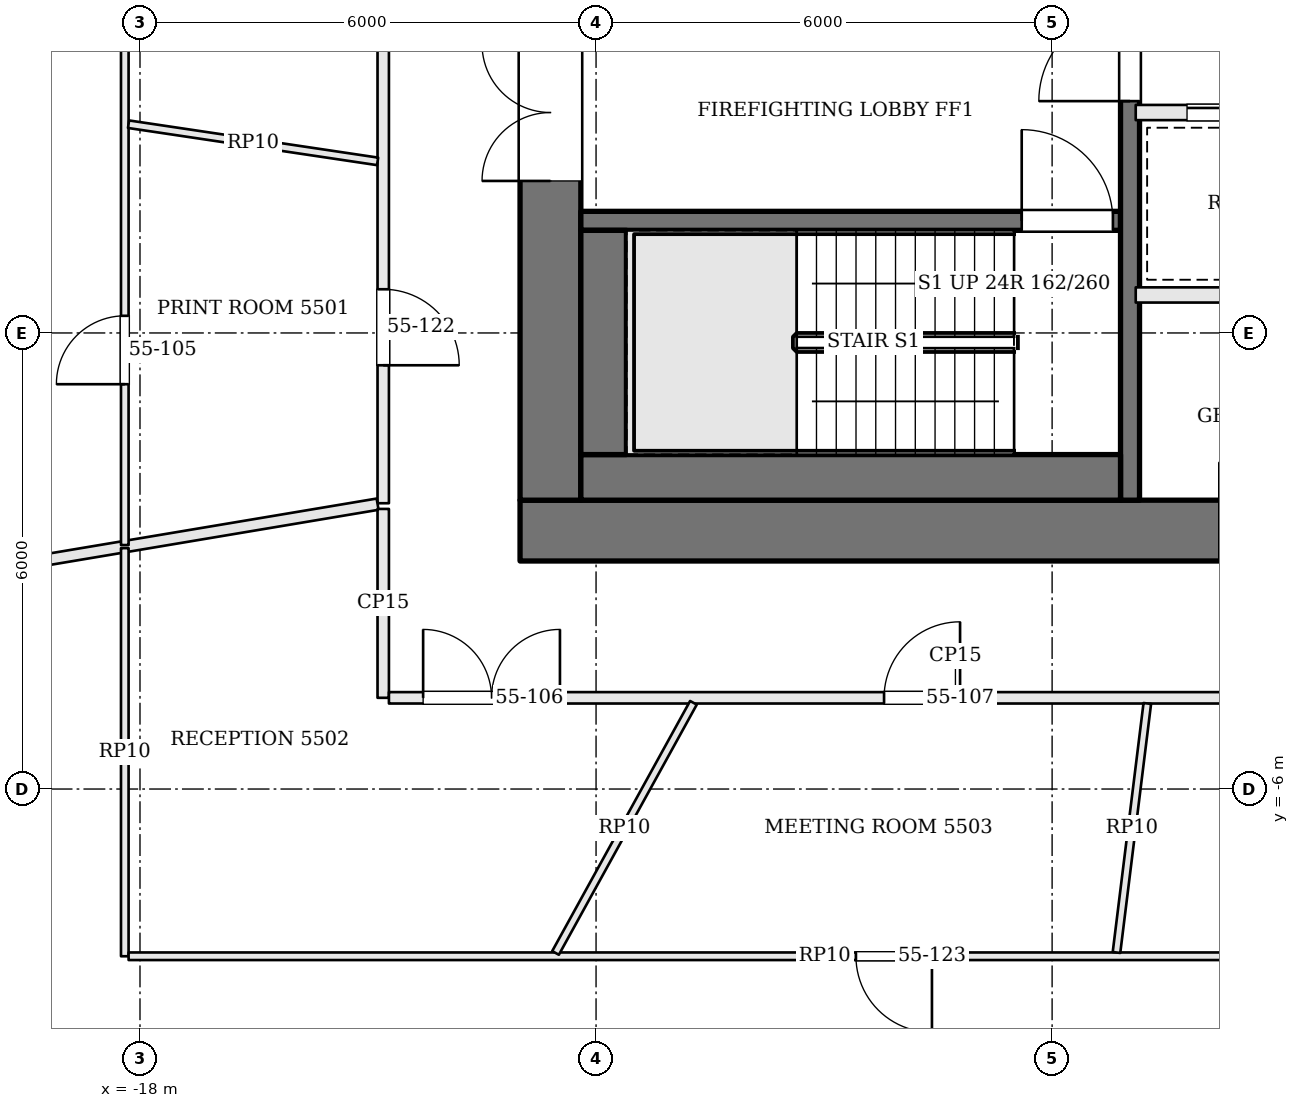
"""IFC4 building model, lengths in metres.
Left out: names, types, materials, properties, quantities, classifications, styles, units other than length and angle.
Written with IfcOpenShell. Run it as: python <this file> out.ifc"""

import sys

from ifc_helpers import new_model, si_unit, direction, frame, frame_2d, origin, place, context, subcontext, project, spatial, rectangle, extrude, element, fill, save


model = new_model("IFC4")
c1 = context("Model", 3, precision=1e-05, world=origin(), true_north=direction((0.0, 1.0)))
c2 = subcontext(c1, "Body", "Model", "MODEL_VIEW")
j1 = project(units=[si_unit("LENGTHUNIT", "METRE"), si_unit("PLANEANGLEUNIT", "RADIAN")], contexts=[c1])
p1 = place(None, origin())
s1 = spatial("IfcSite", under=j1, at=p1, CompositionType="ELEMENT")
p2 = place(p1, origin())
s2 = spatial("IfcBuilding", under=s1, at=p2, CompositionType="ELEMENT")
p3 = place(p2, frame((0.0, 0.0, 225.3)))
s3 = spatial("IfcBuildingStorey", under=s2, at=p3, CompositionType="ELEMENT", Elevation=225.3)
p4 = place(p3, frame((-13.0, -2.6, 0.0), z_axis=(0.0, 0.0, 1.0), x_axis=(1.0, 0.0, 0.0)))
e1 = element("IfcWall", 1, at=p4, inside=s3, PredefinedType="SHEAR", context=c2, shape_type="SweptSolid", body=[
    extrude(rectangle(XDim=26.0, YDim=0.8, at=frame_2d((13.0, 0.0))), origin(), (0.0, 0.0, 1.0), 3.9),
])
p5 = place(p4, frame((9.2, 0.0, 0.0)))
e2 = element("IfcOpeningElement", 2, at=p5, cuts=e1, PredefinedType="OPENING", context=c2, shape_type="SweptSolid", body=[
    extrude(rectangle(XDim=0.9, YDim=2.1, at=frame_2d((0.45, 1.05))), frame((0.0, 0.41, 0.0), z_axis=(0.0, -1.0, 0.0), x_axis=(1.0, 0.0, 0.0)), (0.0, 0.0, 1.0), 0.82),
])
p6 = place(p4, frame((12.3, 0.0, 0.0)))
e3 = element("IfcOpeningElement", 3, at=p6, cuts=e1, PredefinedType="OPENING", context=c2, shape_type="SweptSolid", body=[
    extrude(rectangle(XDim=0.9, YDim=2.1, at=frame_2d((0.45, 1.05))), frame((0.0, 0.41, 0.0), z_axis=(0.0, -1.0, 0.0), x_axis=(1.0, 0.0, 0.0)), (0.0, 0.0, 1.0), 0.82),
])
p7 = place(p4, frame((14.7, 0.0, 0.0)))
e4 = element("IfcOpeningElement", 4, at=p7, cuts=e1, PredefinedType="OPENING", context=c2, shape_type="SweptSolid", body=[
    extrude(rectangle(XDim=1.0, YDim=2.1, at=frame_2d((0.5, 1.05))), frame((0.0, 0.41, 0.0), z_axis=(0.0, -1.0, 0.0), x_axis=(1.0, 0.0, 0.0)), (0.0, 0.0, 1.0), 0.82),
])
p8 = place(p4, frame((16.55, 0.0, 0.0)))
e5 = element("IfcOpeningElement", 5, at=p8, cuts=e1, PredefinedType="OPENING", context=c2, shape_type="SweptSolid", body=[
    extrude(rectangle(XDim=0.9, YDim=2.1, at=frame_2d((0.45, 1.05))), frame((0.0, 0.41, 0.0), z_axis=(0.0, -1.0, 0.0), x_axis=(1.0, 0.0, 0.0)), (0.0, 0.0, 1.0), 0.82),
])
p9 = place(p3, frame((-12.6, -2.2, 0.0), z_axis=(0.0, 0.0, 1.0), x_axis=(0.0, 1.0, 0.0)))
e6 = element("IfcWall", 6, at=p9, inside=s3, PredefinedType="SHEAR", context=c2, shape_type="SweptSolid", body=[
    extrude(rectangle(XDim=13.4, YDim=0.8, at=frame_2d((6.7, 0.0))), origin(), (0.0, 0.0, 1.0), 3.9),
])
p10 = place(p9, frame((4.2, 0.0, 0.0)))
e7 = element("IfcOpeningElement", 7, at=p10, cuts=e6, PredefinedType="OPENING", context=c2, shape_type="SweptSolid", body=[
    extrude(rectangle(XDim=1.8, YDim=2.1, at=frame_2d((0.9, 1.05))), frame((0.0, 0.41, 0.0), z_axis=(0.0, -1.0, 0.0), x_axis=(1.0, 0.0, 0.0)), (0.0, 0.0, 1.0), 0.82),
])
p11 = place(p3, frame((-12.2, 1.475, 0.0), z_axis=(0.0, 0.0, 1.0), x_axis=(1.0, 0.0, 0.0)))
e8 = element("IfcWall", 8, at=p11, inside=s3, PredefinedType="SOLIDWALL", context=c2, shape_type="SweptSolid", body=[
    extrude(rectangle(XDim=7.1, YDim=0.25, at=frame_2d((3.55, 0.0))), origin(), (0.0, 0.0, 1.0), 3.7),
])
p12 = place(p11, frame((5.8, 0.0, 0.0)))
e9 = element("IfcOpeningElement", 9, at=p12, cuts=e8, PredefinedType="OPENING", context=c2, shape_type="SweptSolid", body=[
    extrude(rectangle(XDim=1.2, YDim=2.1, at=frame_2d((0.6, 1.05))), frame((0.0, 0.135, 0.0), z_axis=(0.0, -1.0, 0.0), x_axis=(1.0, 0.0, 0.0)), (0.0, 0.0, 1.0), 0.27),
])
p13 = place(p3, frame((-4.975, -2.2, 0.0), z_axis=(0.0, 0.0, 1.0), x_axis=(0.0, 1.0, 0.0)))
e10 = element("IfcWall", 10, at=p13, inside=s3, PredefinedType="SOLIDWALL", context=c2, shape_type="SweptSolid", body=[
    extrude(rectangle(XDim=13.4, YDim=0.25, at=frame_2d((6.7, 0.0))), origin(), (0.0, 0.0, 1.0), 3.7),
])
p14 = place(p13, frame((5.25, 0.0, 0.0)))
e11 = element("IfcOpeningElement", 11, at=p14, cuts=e10, PredefinedType="OPENING", context=c2, shape_type="SweptSolid", body=[
    extrude(rectangle(XDim=1.2, YDim=2.1, at=frame_2d((0.6, 1.05))), frame((0.0, 0.135, 0.0), z_axis=(0.0, -1.0, 0.0), x_axis=(1.0, 0.0, 0.0)), (0.0, 0.0, 1.0), 0.27),
])
p15 = place(p3, frame((-12.2, -1.9, 0.0), z_axis=(0.0, 0.0, 1.0), x_axis=(1.0, 0.0, 0.0)))
e12 = element("IfcWall", 12, at=p15, inside=s3, PredefinedType="SOLIDWALL", context=c2, shape_type="SweptSolid", body=[
    extrude(rectangle(XDim=7.1, YDim=0.6, at=frame_2d((3.55, 0.0))), origin(), (0.0, 0.0, 1.0), 3.7),
])
p16 = place(p3, frame((-11.9, -1.6, 0.0), z_axis=(0.0, 0.0, 1.0), x_axis=(0.0, 1.0, 0.0)))
e13 = element("IfcWall", 13, at=p16, inside=s3, PredefinedType="SOLIDWALL", context=c2, shape_type="SweptSolid", body=[
    extrude(rectangle(XDim=2.95, YDim=0.6, at=frame_2d((1.475, 0.0))), origin(), (0.0, 0.0, 1.0), 3.7),
])
p17 = place(p3, frame((-4.9, 0.5, 0.0), z_axis=(0.0, 0.0, 1.0), x_axis=(1.0, 0.0, 0.0)))
e14 = element("IfcWall", 14, at=p17, inside=s3, PredefinedType="SOLIDWALL", context=c2, shape_type="SweptSolid", body=[
    extrude(rectangle(XDim=9.8, YDim=0.2, at=frame_2d((4.9, 0.0))), origin(), (0.0, 0.0, 1.0), 3.7),
])
p18 = place(p3, frame((-4.9, 2.9, 0.0), z_axis=(0.0, 0.0, 1.0), x_axis=(1.0, 0.0, 0.0)))
e15 = element("IfcWall", 15, at=p18, inside=s3, PredefinedType="SOLIDWALL", context=c2, shape_type="SweptSolid", body=[
    extrude(rectangle(XDim=9.8, YDim=0.2, at=frame_2d((4.9, 0.0))), origin(), (0.0, 0.0, 1.0), 3.7),
])
p19 = place(p18, frame((0.675, 0.0, 0.0)))
e16 = element("IfcOpeningElement", 16, at=p19, cuts=e15, PredefinedType="OPENING", context=c2, shape_type="SweptSolid", body=[
    extrude(rectangle(XDim=1.1, YDim=2.1, at=frame_2d((0.55, 1.05))), frame((0.0, 0.11, 0.0), z_axis=(0.0, -1.0, 0.0), x_axis=(1.0, 0.0, 0.0)), (0.0, 0.0, 1.0), 0.22),
])
p20 = place(p18, frame((2.613, 0.0, 0.0)))
e17 = element("IfcOpeningElement", 17, at=p20, cuts=e15, PredefinedType="OPENING", context=c2, shape_type="SweptSolid", body=[
    extrude(rectangle(XDim=0.9, YDim=2.1, at=frame_2d((0.45, 1.05))), frame((0.0, 0.11, 0.0), z_axis=(0.0, -1.0, 0.0), x_axis=(1.0, 0.0, 0.0)), (0.0, 0.0, 1.0), 0.22),
])
p21 = place(p18, frame((4.35, 0.0, 0.0)))
e18 = element("IfcOpeningElement", 18, at=p21, cuts=e15, PredefinedType="OPENING", context=c2, shape_type="SweptSolid", body=[
    extrude(rectangle(XDim=1.1, YDim=2.1, at=frame_2d((0.55, 1.05))), frame((0.0, 0.11, 0.0), z_axis=(0.0, -1.0, 0.0), x_axis=(1.0, 0.0, 0.0)), (0.0, 0.0, 1.0), 0.22),
])
p22 = place(p18, frame((7.463, 0.0, 0.0)))
e19 = element("IfcOpeningElement", 19, at=p22, cuts=e15, PredefinedType="OPENING", context=c2, shape_type="SweptSolid", body=[
    extrude(rectangle(XDim=1.0, YDim=2.1, at=frame_2d((0.5, 1.05))), frame((0.0, 0.11, 0.0), z_axis=(0.0, -1.0, 0.0), x_axis=(1.0, 0.0, 0.0)), (0.0, 0.0, 1.0), 0.22),
])
p23 = place(p3, frame((-14.8, 13.725, 0.0), z_axis=(0.0, 0.0, 1.0), x_axis=(0.0, -1.0, 0.0)))
e20 = element("IfcWall", 20, at=p23, inside=s3, PredefinedType="PARTITIONING", context=c2, shape_type="SweptSolid", body=[
    extrude(rectangle(XDim=15.965, YDim=0.15, at=frame_2d((7.982, 0.0))), origin(), (0.0, 0.0, 1.0), 3.084),
])
p24 = place(p23, frame((3.271, 0.0, 0.0)))
e21 = element("IfcOpeningElement", 21, at=p24, cuts=e20, PredefinedType="OPENING", context=c2, shape_type="SweptSolid", body=[
    extrude(rectangle(XDim=1.0, YDim=2.4, at=frame_2d((0.5, 1.2))), frame((0.0, 0.085, 0.0), z_axis=(0.0, -1.0, 0.0), x_axis=(1.0, 0.0, 0.0)), (0.0, 0.0, 1.0), 0.17),
])
p25 = place(p23, frame((8.35, 0.0, 0.0)))
e22 = element("IfcOpeningElement", 22, at=p25, cuts=e20, PredefinedType="OPENING", context=c2, shape_type="SweptSolid", body=[
    extrude(rectangle(XDim=1.0, YDim=2.1, at=frame_2d((0.5, 1.05))), frame((0.0, 0.085, 0.0), z_axis=(0.0, -1.0, 0.0), x_axis=(1.0, 0.0, 0.0)), (0.0, 0.0, 1.0), 0.17),
])
p26 = place(p23, frame((13.15, 0.0, 0.0)))
e23 = element("IfcOpeningElement", 23, at=p26, cuts=e20, PredefinedType="OPENING", context=c2, shape_type="SweptSolid", body=[
    extrude(rectangle(XDim=1.0, YDim=2.1, at=frame_2d((0.5, 1.05))), frame((0.0, 0.085, 0.0), z_axis=(0.0, -1.0, 0.0), x_axis=(1.0, 0.0, 0.0)), (0.0, 0.0, 1.0), 0.17),
])
p27 = place(p3, frame((-28.982, -4.62, 0.0), z_axis=(0.0, 0.0, 1.0), x_axis=(0.986213908907, 0.165475454008, 0.0)))
e24 = element("IfcWall", 24, at=p27, inside=s3, PredefinedType="PARTITIONING", context=c2, shape_type="SweptSolid", body=[
    extrude(rectangle(XDim=14.305, YDim=0.15, at=frame_2d((7.153, 0.0))), origin(), (0.0, 0.0, 1.0), 3.184),
])
p28 = place(p3, frame((-14.8, -2.315, 0.0), z_axis=(0.0, 0.0, 1.0), x_axis=(0.0, -1.0, 0.0)))
e25 = element("IfcWall", 25, at=p28, inside=s3, PredefinedType="PARTITIONING", context=c2, shape_type="SweptSolid", body=[
    extrude(rectangle(XDim=2.485, YDim=0.15, at=frame_2d((1.242, 0.0))), origin(), (0.0, 0.0, 1.0), 3.084),
])
p29 = place(p3, frame((-14.725, -4.8, 0.0), z_axis=(0.0, 0.0, 1.0), x_axis=(1.0, 0.0, 0.0)))
e26 = element("IfcWall", 26, at=p29, inside=s3, PredefinedType="PARTITIONING", context=c2, shape_type="SweptSolid", body=[
    extrude(rectangle(XDim=14.906, YDim=0.15, at=frame_2d((7.453, 0.0))), origin(), (0.0, 0.0, 1.0), 3.084),
])
p30 = place(p29, frame((0.45, 0.0, 0.0)))
e27 = element("IfcOpeningElement", 27, at=p30, cuts=e26, PredefinedType="OPENING", context=c2, shape_type="SweptSolid", body=[
    extrude(rectangle(XDim=1.8, YDim=2.1, at=frame_2d((0.9, 1.05))), frame((0.0, 0.085, 0.0), z_axis=(0.0, -1.0, 0.0), x_axis=(1.0, 0.0, 0.0)), (0.0, 0.0, 1.0), 0.17),
])
p31 = place(p29, frame((6.514, 0.0, 0.0)))
e28 = element("IfcOpeningElement", 28, at=p31, cuts=e26, PredefinedType="OPENING", context=c2, shape_type="SweptSolid", body=[
    extrude(rectangle(XDim=1.0, YDim=2.4, at=frame_2d((0.5, 1.2))), frame((0.0, 0.085, 0.0), z_axis=(0.0, -1.0, 0.0), x_axis=(1.0, 0.0, 0.0)), (0.0, 0.0, 1.0), 0.17),
])
p32 = place(p29, frame((11.85, 0.0, 0.0)))
e29 = element("IfcOpeningElement", 29, at=p32, cuts=e26, PredefinedType="OPENING", context=c2, shape_type="SweptSolid", body=[
    extrude(rectangle(XDim=1.0, YDim=2.1, at=frame_2d((0.5, 1.05))), frame((0.0, 0.085, 0.0), z_axis=(0.0, -1.0, 0.0), x_axis=(1.0, 0.0, 0.0)), (0.0, 0.0, 1.0), 0.17),
])
p33 = place(p3, frame((-18.2, -2.79, 0.0), z_axis=(0.0, 0.0, 1.0), x_axis=(0.0, 1.0, 0.0)))
e30 = element("IfcWall", 30, at=p33, inside=s3, PredefinedType="PARTITIONING", context=c2, shape_type="SweptSolid", body=[
    extrude(rectangle(XDim=19.044, YDim=0.1, at=frame_2d((9.522, 0.0))), origin(), (0.0, 0.0, 1.0), 3.084),
])
p34 = place(p33, frame((7.951, 0.0, 0.0)))
e31 = element("IfcOpeningElement", 31, at=p34, cuts=e30, PredefinedType="OPENING", context=c2, shape_type="SweptSolid", body=[
    extrude(rectangle(XDim=0.9, YDim=2.1, at=frame_2d((0.45, 1.05))), frame((0.0, 0.06, 0.0), z_axis=(0.0, -1.0, 0.0), x_axis=(1.0, 0.0, 0.0)), (0.0, 0.0, 1.0), 0.12),
])
p35 = place(p33, frame((2.116, 0.0, 0.0)))
e32 = element("IfcOpeningElement", 32, at=p35, cuts=e30, PredefinedType="OPENING", context=c2, shape_type="SweptSolid", body=[
    extrude(rectangle(XDim=0.9, YDim=2.1, at=frame_2d((0.45, 1.05))), frame((0.0, 0.06, 0.0), z_axis=(0.0, -1.0, 0.0), x_axis=(1.0, 0.0, 0.0)), (0.0, 0.0, 1.0), 0.12),
])
p36 = place(p3, frame((-14.874, 2.257, 0.0), z_axis=(0.0, 0.0, 1.0), x_axis=(-0.989042600295, 0.147630399314, 0.0)))
e33 = element("IfcWall", 33, at=p36, inside=s3, PredefinedType="PARTITIONING", context=c2, shape_type="SweptSolid", body=[
    extrude(rectangle(XDim=3.312, YDim=0.1, at=frame_2d((1.656, 0.0))), origin(), (0.0, 0.0, 1.0), 3.084),
])
p37 = place(p3, frame((-18.2, -8.2, 0.0), z_axis=(0.0, 0.0, 1.0), x_axis=(0.0, 1.0, 0.0)))
e34 = element("IfcWall", 34, at=p37, inside=s3, PredefinedType="PARTITIONING", context=c2, shape_type="SweptSolid", body=[
    extrude(rectangle(XDim=5.369, YDim=0.1, at=frame_2d((2.685, 0.0))), origin(), (0.0, 0.0, 1.0), 3.084),
])
p38 = place(p3, frame((0.169, -8.2, 0.0), z_axis=(0.0, 0.0, 1.0), x_axis=(-1.0, 0.0, 0.0)))
e35 = element("IfcWall", 35, at=p38, inside=s3, PredefinedType="PARTITIONING", context=c2, shape_type="SweptSolid", body=[
    extrude(rectangle(XDim=18.319, YDim=0.1, at=frame_2d((9.16, 0.0))), origin(), (0.0, 0.0, 1.0), 3.084),
])
p39 = place(p38, frame((2.523, 0.0, 0.0)))
e36 = element("IfcOpeningElement", 36, at=p39, cuts=e35, PredefinedType="OPENING", context=c2, shape_type="SweptSolid", body=[
    extrude(rectangle(XDim=0.9, YDim=2.1, at=frame_2d((0.45, 1.05))), frame((0.0, 0.06, 0.0), z_axis=(0.0, -1.0, 0.0), x_axis=(1.0, 0.0, 0.0)), (0.0, 0.0, 1.0), 0.12),
])
p40 = place(p38, frame((7.75, 0.0, 0.0)))
e37 = element("IfcOpeningElement", 37, at=p40, cuts=e35, PredefinedType="OPENING", context=c2, shape_type="SweptSolid", body=[
    extrude(rectangle(XDim=1.0, YDim=2.4, at=frame_2d((0.5, 1.2))), frame((0.0, 0.06, 0.0), z_axis=(0.0, -1.0, 0.0), x_axis=(1.0, 0.0, 0.0)), (0.0, 0.0, 1.0), 0.12),
])
p41 = place(p3, frame((-10.719, -4.866, 0.0), z_axis=(0.0, 0.0, 1.0), x_axis=(-0.482821394817, -0.87571884798, 0.0)))
e38 = element("IfcWall", 38, at=p41, inside=s3, PredefinedType="PARTITIONING", context=c2, shape_type="SweptSolid", body=[
    extrude(rectangle(XDim=3.758, YDim=0.1, at=frame_2d((1.879, 0.0))), origin(), (0.0, 0.0, 1.0), 3.084),
])
p42 = place(p3, frame((-4.748, -4.875, 0.0), z_axis=(0.0, 0.0, 1.0), x_axis=(-0.122778403884, -0.992434110427, 0.0)))
e39 = element("IfcWall", 39, at=p42, inside=s3, PredefinedType="PARTITIONING", context=c2, shape_type="SweptSolid", body=[
    extrude(rectangle(XDim=3.301, YDim=0.1, at=frame_2d((1.65, 0.0))), origin(), (0.0, 0.0, 1.0), 3.084),
])
p43 = place(p10, origin())
e40 = element("IfcDoor", 40, at=p43, inside=s3, OperationType="DOUBLE_DOOR_SINGLE_SWING", PredefinedType="DOOR", context=c2, shape_type="SweptSolid", body=[
    extrude(rectangle(XDim=1.8, YDim=2.1, at=frame_2d((0.9, 1.05))), frame((0.0, 0.025, 0.0), z_axis=(0.0, -1.0, 0.0), x_axis=(1.0, 0.0, 0.0)), (0.0, 0.0, 1.0), 0.05),
])
fill(e7, e40)
p44 = place(p14, origin())
e41 = element("IfcDoor", 41, at=p44, inside=s3, OperationType="SINGLE_SWING_LEFT", PredefinedType="DOOR", context=c2, shape_type="SweptSolid", body=[
    extrude(rectangle(XDim=1.2, YDim=2.1, at=frame_2d((0.6, 1.05))), frame((0.0, 0.025, 0.0), z_axis=(0.0, -1.0, 0.0), x_axis=(1.0, 0.0, 0.0)), (0.0, 0.0, 1.0), 0.05),
])
fill(e11, e41)
p45 = place(p12, origin())
e42 = element("IfcDoor", 42, at=p45, inside=s3, OperationType="SINGLE_SWING_LEFT", PredefinedType="DOOR", context=c2, shape_type="SweptSolid", body=[
    extrude(rectangle(XDim=1.2, YDim=2.1, at=frame_2d((0.6, 1.05))), frame((0.0, 0.025, 0.0), z_axis=(0.0, -1.0, 0.0), x_axis=(1.0, 0.0, 0.0)), (0.0, 0.0, 1.0), 0.05),
])
fill(e9, e42)
p46 = place(p19, origin())
e43 = element("IfcDoor", 43, at=p46, inside=s3, OperationType="SLIDING_TO_RIGHT", PredefinedType="DOOR", context=c2, shape_type="SweptSolid", body=[
    extrude(rectangle(XDim=1.1, YDim=2.1, at=frame_2d((0.55, 1.05))), frame((0.0, 0.025, 0.0), z_axis=(0.0, -1.0, 0.0), x_axis=(1.0, 0.0, 0.0)), (0.0, 0.0, 1.0), 0.05),
])
fill(e16, e43)
p47 = place(p5, origin())
e44 = element("IfcDoor", 44, at=p47, inside=s3, OperationType="SINGLE_SWING_LEFT", PredefinedType="DOOR", context=c2, shape_type="SweptSolid", body=[
    extrude(rectangle(XDim=0.9, YDim=2.1, at=frame_2d((0.45, 1.05))), frame((0.0, 0.025, 0.0), z_axis=(0.0, -1.0, 0.0), x_axis=(1.0, 0.0, 0.0)), (0.0, 0.0, 1.0), 0.05),
])
fill(e2, e44)
p48 = place(p35, origin())
e45 = element("IfcDoor", 45, at=p48, inside=s3, OperationType="SINGLE_SWING_LEFT", PredefinedType="DOOR", context=c2, shape_type="SweptSolid", body=[
    extrude(rectangle(XDim=0.9, YDim=2.1, at=frame_2d((0.45, 1.05))), frame((0.0, 0.025, 0.0), z_axis=(0.0, -1.0, 0.0), x_axis=(1.0, 0.0, 0.0)), (0.0, 0.0, 1.0), 0.05),
])
fill(e32, e45)
p49 = place(p30, origin())
e46 = element("IfcDoor", 46, at=p49, inside=s3, OperationType="DOUBLE_DOOR_SINGLE_SWING", PredefinedType="DOOR", context=c2, shape_type="SweptSolid", body=[
    extrude(rectangle(XDim=1.8, YDim=2.1, at=frame_2d((0.9, 1.05))), frame((0.0, 0.025, 0.0), z_axis=(0.0, -1.0, 0.0), x_axis=(1.0, 0.0, 0.0)), (0.0, 0.0, 1.0), 0.05),
])
fill(e27, e46)
p50 = place(p31, origin())
e47 = element("IfcDoor", 47, at=p50, inside=s3, OperationType="SINGLE_SWING_RIGHT", PredefinedType="DOOR", context=c2, shape_type="SweptSolid", body=[
    extrude(rectangle(XDim=1.0, YDim=2.4, at=frame_2d((0.5, 1.2))), frame((0.0, 0.025, 0.0), z_axis=(0.0, -1.0, 0.0), x_axis=(1.0, 0.0, 0.0)), (0.0, 0.0, 1.0), 0.05),
])
fill(e28, e47)
p51 = place(p26, origin())
e48 = element("IfcDoor", 48, at=p51, inside=s3, OperationType="SINGLE_SWING_RIGHT", PredefinedType="DOOR", context=c2, shape_type="SweptSolid", body=[
    extrude(rectangle(XDim=1.0, YDim=2.1, at=frame_2d((0.5, 1.05))), frame((0.0, 0.025, 0.0), z_axis=(0.0, -1.0, 0.0), x_axis=(1.0, 0.0, 0.0)), (0.0, 0.0, 1.0), 0.05),
])
fill(e23, e48)
p52 = place(p40, origin())
e49 = element("IfcDoor", 49, at=p52, inside=s3, OperationType="SINGLE_SWING_LEFT", PredefinedType="DOOR", context=c2, shape_type="SweptSolid", body=[
    extrude(rectangle(XDim=1.0, YDim=2.4, at=frame_2d((0.5, 1.2))), frame((0.0, 0.025, 0.0), z_axis=(0.0, -1.0, 0.0), x_axis=(1.0, 0.0, 0.0)), (0.0, 0.0, 1.0), 0.05),
])
fill(e37, e49)
save(model, sys.argv[1])
